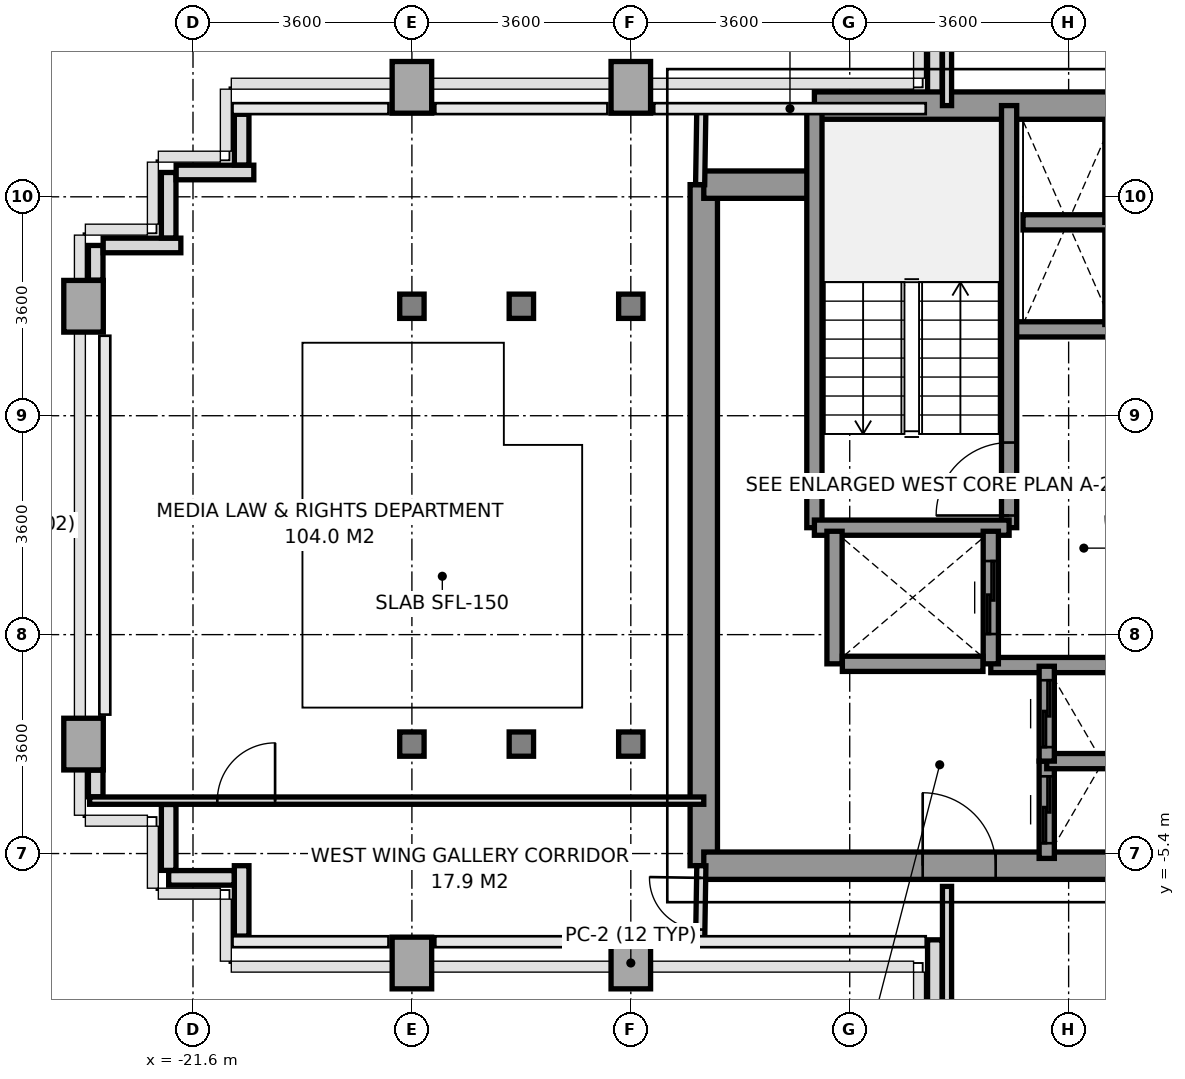
"""IFC4 building model, lengths in metres.
Left out: names, types, materials, properties, quantities, classifications, styles, units other than length and angle.
Written with IfcOpenShell. Run it as: python <this file> out.ifc"""

import sys

from ifc_helpers import new_model, si_unit, direction, frame, frame_2d, origin, origin_2d, place, context, subcontext, project, spatial, rectangle, i_section, extrude, source, transform, mapped, element, fill, save


model = new_model("IFC4")
c1 = context("Model", 3, precision=1e-05, world=origin(), true_north=direction((0.0, 1.0)))
c2 = subcontext(c1, "Body", "Model", "MODEL_VIEW")
j1 = project(units=[si_unit("LENGTHUNIT", "METRE"), si_unit("PLANEANGLEUNIT", "RADIAN")], contexts=[c1])
p1 = place(None, origin())
s1 = spatial("IfcSite", under=j1, at=p1, CompositionType="ELEMENT")
p2 = place(p1, origin())
s2 = spatial("IfcBuilding", under=s1, at=p2, CompositionType="ELEMENT")
p3 = place(p2, frame((0.0, 0.0, 131.2)))
s3 = spatial("IfcBuildingStorey", under=s2, at=p3, CompositionType="ELEMENT", Elevation=131.2)
m1 = source(origin(), c2, "Body", "SweptSolid", [
    extrude(rectangle(XDim=0.65, YDim=0.85, at=origin_2d()), origin(), (0.0, 0.0, 1.0), 3.2),
])
for number, where, z_axis, x_axis in (
    (1, (-23.4, -3.6, 0.0), (0.0, 0.0, 1.0), (1.0, 0.0, 0.0)),
    (2, (-23.4, 3.6, 0.0), (0.0, 0.0, 1.0), (1.0, 0.0, 0.0)),
    (3, (-18.0, -7.2, 0.0), (0.0, 0.0, 1.0), (1.0, 0.0, 0.0)),
):
    element("IfcColumn", number, at=place(p3, frame(where, z_axis=z_axis, x_axis=x_axis)), inside=s3, PredefinedType="COLUMN", context=c2, shape_type="MappedRepresentation", body=[
        mapped(m1, transform((0.0, 0.0, 0.0), x_axis=(1.0, 0.0, 0.0), y_axis=(0.0, 1.0, 0.0), z_axis=(0.0, 0.0, 1.0), scale=1.0)),
    ])
m2 = source(origin(), c2, "Body", "SweptSolid", [
    extrude(i_section(OverallWidth=0.401, OverallDepth=0.399, WebThickness=0.02, FlangeThickness=0.032, at=origin_2d()), origin(), (0.0, 0.0, 1.0), 3.2),
])
for number, where, z_axis, x_axis in (
    (4, (-18.0, -3.6, 0.0), (0.0, 0.0, 1.0), (1.0, 0.0, 0.0)),
    (5, (-18.0, 3.6, 0.0), (0.0, 0.0, 1.0), (1.0, 0.0, 0.0)),
):
    element("IfcColumn", number, at=place(p3, frame(where, z_axis=z_axis, x_axis=x_axis)), inside=s3, PredefinedType="COLUMN", context=c2, shape_type="MappedRepresentation", body=[
        mapped(m2, transform((0.0, 0.0, 0.0), x_axis=(1.0, 0.0, 0.0), y_axis=(0.0, 1.0, 0.0), z_axis=(0.0, 0.0, 1.0), scale=1.0)),
    ])
p4 = place(p3, frame((-18.0, 7.2, 0.0), z_axis=(0.0, 0.0, 1.0), x_axis=(1.0, 0.0, 0.0)))
e6 = element("IfcColumn", 6, at=p4, inside=s3, PredefinedType="COLUMN", context=c2, shape_type="MappedRepresentation", body=[
    mapped(m1, transform((0.0, 0.0, 0.0), x_axis=(1.0, 0.0, 0.0), y_axis=(0.0, 1.0, 0.0), z_axis=(0.0, 0.0, 1.0), scale=1.0)),
])
for number, where, z_axis, x_axis in (
    (7, (-16.2, -3.6, 0.0), (0.0, 0.0, 1.0), (1.0, 0.0, 0.0)),
    (8, (-16.2, 3.6, 0.0), (0.0, 0.0, 1.0), (1.0, 0.0, 0.0)),
):
    element("IfcColumn", number, at=place(p3, frame(where, z_axis=z_axis, x_axis=x_axis)), inside=s3, PredefinedType="COLUMN", context=c2, shape_type="MappedRepresentation", body=[
        mapped(m2, transform((0.0, 0.0, 0.0), x_axis=(1.0, 0.0, 0.0), y_axis=(0.0, 1.0, 0.0), z_axis=(0.0, 0.0, 1.0), scale=1.0)),
    ])
p5 = place(p3, frame((-14.4, -7.2, 0.0), z_axis=(0.0, 0.0, 1.0), x_axis=(1.0, 0.0, 0.0)))
e9 = element("IfcColumn", 9, at=p5, inside=s3, PredefinedType="COLUMN", context=c2, shape_type="MappedRepresentation", body=[
    mapped(m1, transform((0.0, 0.0, 0.0), x_axis=(1.0, 0.0, 0.0), y_axis=(0.0, 1.0, 0.0), z_axis=(0.0, 0.0, 1.0), scale=1.0)),
])
for number, where, z_axis, x_axis in (
    (10, (-14.4, -3.6, 0.0), (0.0, 0.0, 1.0), (1.0, 0.0, 0.0)),
    (11, (-14.4, 3.6, 0.0), (0.0, 0.0, 1.0), (1.0, 0.0, 0.0)),
):
    element("IfcColumn", number, at=place(p3, frame(where, z_axis=z_axis, x_axis=x_axis)), inside=s3, PredefinedType="COLUMN", context=c2, shape_type="MappedRepresentation", body=[
        mapped(m2, transform((0.0, 0.0, 0.0), x_axis=(1.0, 0.0, 0.0), y_axis=(0.0, 1.0, 0.0), z_axis=(0.0, 0.0, 1.0), scale=1.0)),
    ])
p6 = place(p3, frame((-14.4, 7.2, 0.0), z_axis=(0.0, 0.0, 1.0), x_axis=(1.0, 0.0, 0.0)))
e12 = element("IfcColumn", 12, at=p6, inside=s3, PredefinedType="COLUMN", context=c2, shape_type="MappedRepresentation", body=[
    mapped(m1, transform((0.0, 0.0, 0.0), x_axis=(1.0, 0.0, 0.0), y_axis=(0.0, 1.0, 0.0), z_axis=(0.0, 0.0, 1.0), scale=1.0)),
])
p7 = place(p3, frame((-9.4, -8.472, 0.0), z_axis=(0.0, 0.0, 1.0), x_axis=(0.0, 1.0, 0.0)))
e13 = element("IfcWall", 13, at=p7, inside=s3, PredefinedType="PARAPET", context=c2, shape_type="SweptSolid", body=[
    extrude(rectangle(XDim=1.653, YDim=0.24, at=frame_2d((0.827, 0.0))), origin(), (0.0, 0.0, 1.0), 1.15),
])
p8 = place(p3, frame((-20.8, -6.757, 0.0), z_axis=(0.0, 0.0, 1.0), x_axis=(0.0, 1.0, 0.0)))
e14 = element("IfcWall", 14, at=p8, inside=s3, PredefinedType="PARAPET", context=c2, shape_type="SweptSolid", body=[
    extrude(rectangle(XDim=1.157, YDim=0.24, at=frame_2d((0.579, 0.0))), origin(), (0.0, 0.0, 1.0), 1.15),
])
p9 = place(p3, frame((-20.923, -5.8, 0.0), z_axis=(0.0, 0.0, 1.0), x_axis=(-1.0, 0.0, 0.0)))
e15 = element("IfcWall", 15, at=p9, inside=s3, PredefinedType="PARAPET", context=c2, shape_type="SweptSolid", body=[
    extrude(rectangle(XDim=1.077, YDim=0.24, at=frame_2d((0.539, 0.0))), origin(), (0.0, 0.0, 1.0), 1.15),
])
p10 = place(p3, frame((-22.0, -5.677, 0.0), z_axis=(0.0, 0.0, 1.0), x_axis=(0.0, 1.0, 0.0)))
e16 = element("IfcWall", 16, at=p10, inside=s3, PredefinedType="PARAPET", context=c2, shape_type="SweptSolid", body=[
    extrude(rectangle(XDim=1.084, YDim=0.24, at=frame_2d((0.542, 0.0))), origin(), (0.0, 0.0, 1.0), 1.15),
])
p11 = place(p3, frame((-23.2, -4.467, 0.0), z_axis=(0.0, 0.0, 1.0), x_axis=(0.0, 1.0, 0.0)))
e17 = element("IfcWall", 17, at=p11, inside=s3, PredefinedType="PARAPET", context=c2, shape_type="SweptSolid", body=[
    extrude(rectangle(XDim=0.439, YDim=0.24, at=frame_2d((0.219, 0.0))), origin(), (0.0, 0.0, 1.0), 1.15),
])
p12 = place(p3, frame((-23.2, 4.028, 0.0), z_axis=(0.0, 0.0, 1.0), x_axis=(0.0, 1.0, 0.0)))
e18 = element("IfcWall", 18, at=p12, inside=s3, PredefinedType="PARAPET", context=c2, shape_type="SweptSolid", body=[
    extrude(rectangle(XDim=0.572, YDim=0.24, at=frame_2d((0.286, 0.0))), origin(), (0.0, 0.0, 1.0), 1.15),
])
p13 = place(p3, frame((-23.077, 4.6, 0.0), z_axis=(0.0, 0.0, 1.0), x_axis=(1.0, 0.0, 0.0)))
e19 = element("IfcWall", 19, at=p13, inside=s3, PredefinedType="PARAPET", context=c2, shape_type="SweptSolid", body=[
    extrude(rectangle(XDim=1.277, YDim=0.24, at=frame_2d((0.638, 0.0))), origin(), (0.0, 0.0, 1.0), 1.15),
])
p14 = place(p3, frame((-22.0, 4.723, 0.0), z_axis=(0.0, 0.0, 1.0), x_axis=(0.0, 1.0, 0.0)))
e20 = element("IfcWall", 20, at=p14, inside=s3, PredefinedType="PARAPET", context=c2, shape_type="SweptSolid", body=[
    extrude(rectangle(XDim=1.077, YDim=0.24, at=frame_2d((0.539, 0.0))), origin(), (0.0, 0.0, 1.0), 1.15),
])
p15 = place(p3, frame((-21.877, 5.8, 0.0), z_axis=(0.0, 0.0, 1.0), x_axis=(1.0, 0.0, 0.0)))
e21 = element("IfcWall", 21, at=p15, inside=s3, PredefinedType="PARAPET", context=c2, shape_type="SweptSolid", body=[
    extrude(rectangle(XDim=1.277, YDim=0.24, at=frame_2d((0.638, 0.0))), origin(), (0.0, 0.0, 1.0), 1.15),
])
p16 = place(p3, frame((-20.8, 5.923, 0.0), z_axis=(0.0, 0.0, 1.0), x_axis=(0.0, 1.0, 0.0)))
e22 = element("IfcWall", 22, at=p16, inside=s3, PredefinedType="PARAPET", context=c2, shape_type="SweptSolid", body=[
    extrude(rectangle(XDim=0.834, YDim=0.24, at=frame_2d((0.417, 0.0))), origin(), (0.0, 0.0, 1.0), 1.15),
])
p17 = place(p3, frame((-9.4, 6.953, 0.0), z_axis=(0.0, 0.0, 1.0), x_axis=(0.0, 1.0, 0.0)))
e23 = element("IfcWall", 23, at=p17, inside=s3, PredefinedType="PARAPET", context=c2, shape_type="SweptSolid", body=[
    extrude(rectangle(XDim=1.519, YDim=0.24, at=frame_2d((0.76, 0.0))), origin(), (0.0, 0.0, 1.0), 1.15),
])
p18 = place(p3, frame((-13.2, -5.6, 0.0), z_axis=(0.0, 0.0, 1.0), x_axis=(0.0, 1.0, 0.0)))
e24 = element("IfcWall", 24, at=p18, inside=s3, PredefinedType="SHEAR", context=c2, shape_type="SweptSolid", body=[
    extrude(rectangle(XDim=11.2, YDim=0.45, at=frame_2d((5.6, 0.0))), origin(), (0.0, 0.0, 1.0), 3.2),
])
p19 = place(p3, frame((-11.381, 6.9, 0.0), z_axis=(0.0, 0.0, 1.0), x_axis=(1.0, 0.0, 0.0)))
e25 = element("IfcWall", 25, at=p19, inside=s3, PredefinedType="SHEAR", context=c2, shape_type="SweptSolid", body=[
    extrude(rectangle(XDim=5.981, YDim=0.45, at=frame_2d((2.991, 0.0))), origin(), (0.0, 0.0, 1.0), 3.2),
])
p20 = place(p3, frame((-13.2, 5.6, 0.0), z_axis=(0.0, 0.0, 1.0), x_axis=(1.0, 0.0, 0.0)))
e26 = element("IfcWall", 26, at=p20, inside=s3, PredefinedType="SHEAR", context=c2, shape_type="SweptSolid", body=[
    extrude(rectangle(XDim=1.819, YDim=0.45, at=frame_2d((0.909, 0.0))), origin(), (0.0, 0.0, 1.0), 3.2),
])
p21 = place(p3, frame((-13.2, -5.6, 0.0), z_axis=(0.0, 0.0, 1.0), x_axis=(1.0, 0.0, 0.0)))
e27 = element("IfcWall", 27, at=p21, inside=s3, PredefinedType="SHEAR", context=c2, shape_type="SweptSolid", body=[
    extrude(rectangle(XDim=7.8, YDim=0.45, at=frame_2d((3.9, 0.0))), origin(), (0.0, 0.0, 1.0), 3.2),
])
p22 = place(p21, frame((3.6, 0.0, 0.0)))
e28 = element("IfcOpeningElement", 28, at=p22, cuts=e27, PredefinedType="OPENING", context=c2, shape_type="SweptSolid", body=[
    extrude(rectangle(XDim=1.2, YDim=2.2, at=frame_2d((0.6, 1.1))), frame((0.0, 0.235, 0.0), z_axis=(0.0, -1.0, 0.0), x_axis=(1.0, 0.0, 0.0)), (0.0, 0.0, 1.0), 0.47),
])
p23 = place(p3, frame((-8.18, 3.22, 0.0), z_axis=(0.0, 0.0, 1.0), x_axis=(1.0, 0.0, 0.0)))
e29 = element("IfcWall", 29, at=p23, inside=s3, PredefinedType="SOLIDWALL", context=c2, shape_type="SweptSolid", body=[
    extrude(rectangle(XDim=2.78, YDim=0.25, at=frame_2d((1.39, 0.0))), origin(), (0.0, 0.0, 1.0), 3.2),
])
p24 = place(p3, frame((-8.48, -2.3, 0.0), z_axis=(0.0, 0.0, 1.0), x_axis=(1.0, 0.0, 0.0)))
e30 = element("IfcWall", 30, at=p24, inside=s3, PredefinedType="SOLIDWALL", context=c2, shape_type="SweptSolid", body=[
    extrude(rectangle(XDim=3.08, YDim=0.25, at=frame_2d((1.54, 0.0))), origin(), (0.0, 0.0, 1.0), 3.2),
])
p25 = place(p3, frame((-8.179, -0.041, 0.0), z_axis=(0.0, 0.0, 1.0), x_axis=(0.0, 1.0, 0.0)))
e31 = element("IfcWall", 31, at=p25, inside=s3, PredefinedType="SOLIDWALL", context=c2, shape_type="SweptSolid", body=[
    extrude(rectangle(XDim=6.941, YDim=0.25, at=frame_2d((3.47, 0.0))), origin(), (0.0, 0.0, 1.0), 3.2),
])
p26 = place(p25, frame((0.2, 0.0, 0.0)))
e32 = element("IfcOpeningElement", 32, at=p26, cuts=e31, PredefinedType="OPENING", context=c2, shape_type="SweptSolid", body=[
    extrude(rectangle(XDim=1.2, YDim=2.2, at=frame_2d((0.6, 1.1))), frame((0.0, 0.135, 0.0), z_axis=(0.0, -1.0, 0.0), x_axis=(1.0, 0.0, 0.0)), (0.0, 0.0, 1.0), 0.27),
])
p27 = place(p3, frame((-11.381, -0.041, 0.0), z_axis=(0.0, 0.0, 1.0), x_axis=(0.0, 1.0, 0.0)))
e33 = element("IfcWall", 33, at=p27, inside=s3, PredefinedType="SOLIDWALL", context=c2, shape_type="SweptSolid", body=[
    extrude(rectangle(XDim=6.941, YDim=0.25, at=frame_2d((3.47, 0.0))), origin(), (0.0, 0.0, 1.0), 3.2),
])
p28 = place(p3, frame((-11.381, -0.041, 0.0), z_axis=(0.0, 0.0, 1.0), x_axis=(1.0, 0.0, 0.0)))
e34 = element("IfcWall", 34, at=p28, inside=s3, PredefinedType="SOLIDWALL", context=c2, shape_type="SweptSolid", body=[
    extrude(rectangle(XDim=3.202, YDim=0.25, at=frame_2d((1.601, 0.0))), origin(), (0.0, 0.0, 1.0), 3.2),
])
p29 = place(p3, frame((-11.05, -2.28, 0.0), z_axis=(0.0, 0.0, 1.0), x_axis=(0.0, 1.0, 0.0)))
e35 = element("IfcWall", 35, at=p29, inside=s3, PredefinedType="SOLIDWALL", context=c2, shape_type="SweptSolid", body=[
    extrude(rectangle(XDim=2.18, YDim=0.25, at=frame_2d((1.09, 0.0))), origin(), (0.0, 0.0, 1.0), 3.2),
])
p30 = place(p3, frame((-8.48, -2.28, 0.0), z_axis=(0.0, 0.0, 1.0), x_axis=(0.0, 1.0, 0.0)))
e36 = element("IfcWall", 36, at=p30, inside=s3, PredefinedType="SOLIDWALL", context=c2, shape_type="SweptSolid", body=[
    extrude(rectangle(XDim=2.18, YDim=0.25, at=frame_2d((1.09, 0.0))), origin(), (0.0, 0.0, 1.0), 3.2),
])
p31 = place(p30, frame((0.49, 0.0, 0.0)))
e37 = element("IfcOpeningElement", 37, at=p31, cuts=e36, PredefinedType="OPENING", context=c2, shape_type="SweptSolid", body=[
    extrude(rectangle(XDim=1.2, YDim=2.2, at=frame_2d((0.6, 1.1))), frame((0.0, 0.135, 0.0), z_axis=(0.0, -1.0, 0.0), x_axis=(1.0, 0.0, 0.0)), (0.0, 0.0, 1.0), 0.27),
])
p32 = place(p3, frame((-10.921, -2.28, 0.0), z_axis=(0.0, 0.0, 1.0), x_axis=(1.0, 0.0, 0.0)))
e38 = element("IfcWall", 38, at=p32, inside=s3, PredefinedType="SOLIDWALL", context=c2, shape_type="SweptSolid", body=[
    extrude(rectangle(XDim=2.312, YDim=0.25, at=frame_2d((1.156, 0.0))), origin(), (0.0, 0.0, 1.0), 3.2),
])
p33 = place(p3, frame((-7.56, -5.48, 0.0), z_axis=(0.0, 0.0, 1.0), x_axis=(0.0, 1.0, 0.0)))
e39 = element("IfcWall", 39, at=p33, inside=s3, PredefinedType="SOLIDWALL", context=c2, shape_type="SweptSolid", body=[
    extrude(rectangle(XDim=1.6, YDim=0.25, at=frame_2d((0.8, 0.0))), origin(), (0.0, 0.0, 1.0), 3.2),
])
p34 = place(p33, frame((0.25, 0.0, 0.0)))
e40 = element("IfcOpeningElement", 40, at=p34, cuts=e39, PredefinedType="OPENING", context=c2, shape_type="SweptSolid", body=[
    extrude(rectangle(XDim=1.1, YDim=2.2, at=frame_2d((0.55, 1.1))), frame((0.0, 0.135, 0.0), z_axis=(0.0, -1.0, 0.0), x_axis=(1.0, 0.0, 0.0)), (0.0, 0.0, 1.0), 0.27),
])
p35 = place(p3, frame((-7.56, -3.88, 0.0), z_axis=(0.0, 0.0, 1.0), x_axis=(1.0, 0.0, 0.0)))
e41 = element("IfcWall", 41, at=p35, inside=s3, PredefinedType="SOLIDWALL", context=c2, shape_type="SweptSolid", body=[
    extrude(rectangle(XDim=1.84, YDim=0.25, at=frame_2d((0.92, 0.0))), origin(), (0.0, 0.0, 1.0), 3.2),
])
p36 = place(p3, frame((-7.56, -3.88, 0.0), z_axis=(0.0, 0.0, 1.0), x_axis=(0.0, 1.0, 0.0)))
e42 = element("IfcWall", 42, at=p36, inside=s3, PredefinedType="SOLIDWALL", context=c2, shape_type="SweptSolid", body=[
    extrude(rectangle(XDim=1.56, YDim=0.25, at=frame_2d((0.78, 0.0))), origin(), (0.0, 0.0, 1.0), 3.2),
])
p37 = place(p36, frame((0.23, 0.0, 0.0)))
e43 = element("IfcOpeningElement", 43, at=p37, cuts=e42, PredefinedType="OPENING", context=c2, shape_type="SweptSolid", body=[
    extrude(rectangle(XDim=1.1, YDim=2.2, at=frame_2d((0.55, 1.1))), frame((0.0, 0.135, 0.0), z_axis=(0.0, -1.0, 0.0), x_axis=(1.0, 0.0, 0.0)), (0.0, 0.0, 1.0), 0.27),
])
p38 = place(p3, frame((-6.48, 3.3, 0.0), z_axis=(0.0, 0.0, 1.0), x_axis=(0.0, 1.0, 0.0)))
e44 = element("IfcWall", 44, at=p38, inside=s3, PredefinedType="SOLIDWALL", context=c2, shape_type="SweptSolid", body=[
    extrude(rectangle(XDim=1.68, YDim=0.25, at=frame_2d((0.84, 0.0))), origin(), (0.0, 0.0, 1.0), 3.2),
])
p39 = place(p3, frame((-7.95, 4.98, 0.0), z_axis=(0.0, 0.0, 1.0), x_axis=(1.0, 0.0, 0.0)))
e45 = element("IfcWall", 45, at=p39, inside=s3, PredefinedType="SOLIDWALL", context=c2, shape_type="SweptSolid", body=[
    extrude(rectangle(XDim=1.47, YDim=0.25, at=frame_2d((0.735, 0.0))), origin(), (0.0, 0.0, 1.0), 3.2),
])
p40 = place(p3, frame((-6.48, 4.98, 0.0), z_axis=(0.0, 0.0, 1.0), x_axis=(0.0, 1.0, 0.0)))
e46 = element("IfcWall", 46, at=p40, inside=s3, PredefinedType="SOLIDWALL", context=c2, shape_type="SweptSolid", body=[
    extrude(rectangle(XDim=1.67, YDim=0.25, at=frame_2d((0.835, 0.0))), origin(), (0.0, 0.0, 1.0), 3.2),
])
p41 = place(p3, frame((-9.2, 6.9, 0.0), z_axis=(0.0, 0.0, 1.0), x_axis=(0.0, 1.0, 0.0)))
e47 = element("IfcWall", 47, at=p41, inside=s3, PredefinedType="PARTITIONING", context=c2, shape_type="SweptSolid", body=[
    extrude(rectangle(XDim=8.78, YDim=0.15, at=frame_2d((4.39, 0.0))), origin(), (0.0, 0.0, 1.0), 2.7),
])
p42 = place(p3, frame((-9.2, -15.68, 0.0), z_axis=(0.0, 0.0, 1.0), x_axis=(0.0, 1.0, 0.0)))
e48 = element("IfcWall", 48, at=p42, inside=s3, PredefinedType="PARTITIONING", context=c2, shape_type="SweptSolid", body=[
    extrude(rectangle(XDim=9.74, YDim=0.15, at=frame_2d((4.87, 0.0))), origin(), (0.0, 0.0, 1.0), 2.7),
])
p43 = place(p3, frame((-13.26, 5.6, 0.0), z_axis=(0.0, 0.0, 1.0), x_axis=(0.016013571389, 0.999871774545, 0.0)))
e49 = element("IfcWall", 49, at=p43, inside=s3, PredefinedType="PARTITIONING", context=c2, shape_type="SweptSolid", body=[
    extrude(rectangle(XDim=1.25, YDim=0.15, at=frame_2d((0.625, 0.0))), origin(), (0.0, 0.0, 1.0), 3.2),
])
p44 = place(p3, frame((-13.26, -6.85, 0.0), z_axis=(0.0, 0.0, 1.0), x_axis=(0.016013571389, 0.999871774545, 0.0)))
e50 = element("IfcWall", 50, at=p44, inside=s3, PredefinedType="PARTITIONING", context=c2, shape_type="SweptSolid", body=[
    extrude(rectangle(XDim=1.25, YDim=0.15, at=frame_2d((0.625, 0.0))), origin(), (0.0, 0.0, 1.0), 3.2),
])
p45 = place(p44, frame((0.2, 0.0, 0.0)))
e51 = element("IfcOpeningElement", 51, at=p45, cuts=e50, PredefinedType="OPENING", context=c2, shape_type="SweptSolid", body=[
    extrude(rectangle(XDim=0.85, YDim=2.1, at=frame_2d((0.425, 1.05))), frame((0.0, 0.085, 0.0), z_axis=(0.0, -1.0, 0.0), x_axis=(1.0, 0.0, 0.0)), (0.0, 0.0, 1.0), 0.17),
])
p46 = place(p3, frame((-23.3, -4.53, 0.0), z_axis=(0.0, 0.0, 1.0), x_axis=(1.0, 0.0, 0.0)))
e52 = element("IfcWall", 52, at=p46, inside=s3, PredefinedType="PARTITIONING", context=c2, shape_type="SweptSolid", body=[
    extrude(rectangle(XDim=10.1, YDim=0.12, at=frame_2d((5.05, 0.0))), origin(), (0.0, 0.0, 1.0), 2.76),
])
p47 = place(p46, frame((2.1, 0.0, 0.0)))
e53 = element("IfcOpeningElement", 53, at=p47, cuts=e52, PredefinedType="OPENING", context=c2, shape_type="SweptSolid", body=[
    extrude(rectangle(XDim=0.95, YDim=2.15, at=frame_2d((0.475, 1.075))), frame((0.0, 0.07, 0.0), z_axis=(0.0, -1.0, 0.0), x_axis=(1.0, 0.0, 0.0)), (0.0, 0.0, 1.0), 0.14),
])
m3 = source(origin(), c2, "Body", "SweptSolid", [
    extrude(rectangle(XDim=1.2, YDim=2.2, at=frame_2d((0.6, 1.1))), frame((0.0, 0.025, 0.0), z_axis=(0.0, -1.0, 0.0), x_axis=(1.0, 0.0, 0.0)), (0.0, 0.0, 1.0), 0.05),
])
p48 = place(p26, origin())
e54 = element("IfcDoor", 54, at=p48, inside=s3, OperationType="SINGLE_SWING_LEFT", PredefinedType="DOOR", context=c2, shape_type="MappedRepresentation", body=[
    mapped(m3, transform((0.0, 0.0, 0.0), x_axis=(1.0, 0.0, 0.0), y_axis=(0.0, 1.0, 0.0), z_axis=(0.0, 0.0, 1.0), scale=1.0)),
])
fill(e32, e54)
p49 = place(p22, origin())
e55 = element("IfcDoor", 55, at=p49, inside=s3, OperationType="SINGLE_SWING_LEFT", PredefinedType="DOOR", context=c2, shape_type="MappedRepresentation", body=[
    mapped(m3, transform((0.0, 0.0, 0.0), x_axis=(1.0, 0.0, 0.0), y_axis=(0.0, 1.0, 0.0), z_axis=(0.0, 0.0, 1.0), scale=1.0)),
])
fill(e28, e55)
p50 = place(p31, origin())
e56 = element("IfcDoor", 56, at=p50, inside=s3, OperationType="SLIDING_TO_RIGHT", PredefinedType="DOOR", context=c2, shape_type="MappedRepresentation", body=[
    mapped(m3, transform((0.0, 0.0, 0.0), x_axis=(1.0, 0.0, 0.0), y_axis=(0.0, 1.0, 0.0), z_axis=(0.0, 0.0, 1.0), scale=1.0)),
])
fill(e37, e56)
m4 = source(origin(), c2, "Body", "SweptSolid", [
    extrude(rectangle(XDim=1.1, YDim=2.2, at=frame_2d((0.55, 1.1))), frame((0.0, 0.025, 0.0), z_axis=(0.0, -1.0, 0.0), x_axis=(1.0, 0.0, 0.0)), (0.0, 0.0, 1.0), 0.05),
])
p51 = place(p34, origin())
e57 = element("IfcDoor", 57, at=p51, inside=s3, OperationType="SLIDING_TO_LEFT", PredefinedType="DOOR", context=c2, shape_type="MappedRepresentation", body=[
    mapped(m4, transform((0.0, 0.0, 0.0), x_axis=(1.0, 0.0, 0.0), y_axis=(0.0, 1.0, 0.0), z_axis=(0.0, 0.0, 1.0), scale=1.0)),
])
fill(e40, e57)
p52 = place(p37, origin())
e58 = element("IfcDoor", 58, at=p52, inside=s3, OperationType="SLIDING_TO_LEFT", PredefinedType="DOOR", context=c2, shape_type="MappedRepresentation", body=[
    mapped(m4, transform((0.0, 0.0, 0.0), x_axis=(1.0, 0.0, 0.0), y_axis=(0.0, 1.0, 0.0), z_axis=(0.0, 0.0, 1.0), scale=1.0)),
])
fill(e43, e58)
m5 = source(origin(), c2, "Body", "SweptSolid", [
    extrude(rectangle(XDim=0.85, YDim=2.1, at=frame_2d((0.425, 1.05))), frame((0.0, 0.025, 0.0), z_axis=(0.0, -1.0, 0.0), x_axis=(1.0, 0.0, 0.0)), (0.0, 0.0, 1.0), 0.05),
])
p53 = place(p45, origin())
e59 = element("IfcDoor", 59, at=p53, inside=s3, OperationType="SINGLE_SWING_RIGHT", PredefinedType="DOOR", context=c2, shape_type="MappedRepresentation", body=[
    mapped(m5, transform((0.0, 0.0, 0.0), x_axis=(1.0, 0.0, 0.0), y_axis=(0.0, 1.0, 0.0), z_axis=(0.0, 0.0, 1.0), scale=1.0)),
])
fill(e51, e59)
m6 = source(origin(), c2, "Body", "SweptSolid", [
    extrude(rectangle(XDim=0.95, YDim=2.15, at=frame_2d((0.475, 1.075))), frame((0.0, 0.025, 0.0), z_axis=(0.0, -1.0, 0.0), x_axis=(1.0, 0.0, 0.0)), (0.0, 0.0, 1.0), 0.05),
])
p54 = place(p47, origin())
e60 = element("IfcDoor", 60, at=p54, inside=s3, OperationType="SINGLE_SWING_RIGHT", PredefinedType="DOOR", context=c2, shape_type="MappedRepresentation", body=[
    mapped(m6, transform((0.0, 0.0, 0.0), x_axis=(1.0, 0.0, 0.0), y_axis=(0.0, 1.0, 0.0), z_axis=(0.0, 0.0, 1.0), scale=1.0)),
])
fill(e53, e60)
save(model, sys.argv[1])
